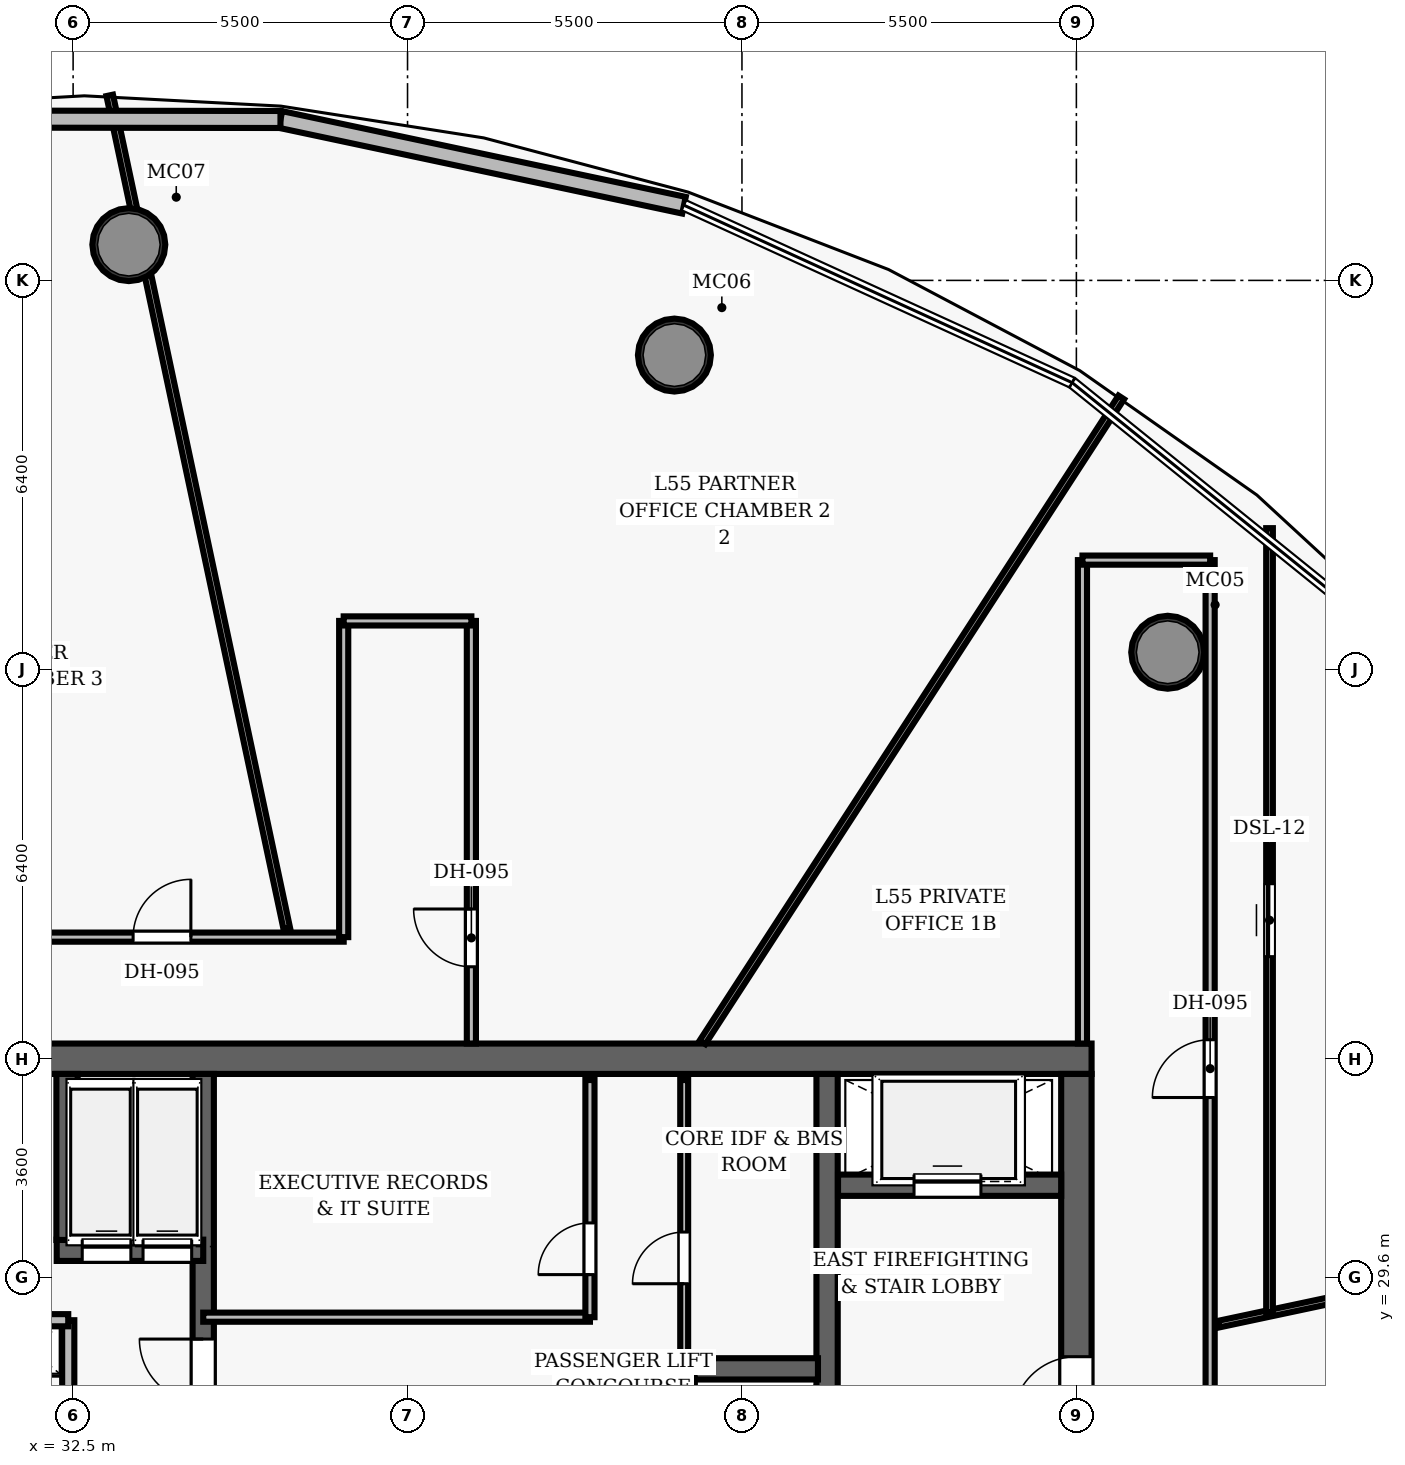
"""IFC4 building model, lengths in metres.
Left out: names, types, materials, properties, quantities, classifications, styles, units other than length and angle.
Written with IfcOpenShell. Run it as: python <this file> out.ifc"""

import sys

from ifc_helpers import new_model, si_unit, direction, frame, frame_2d, origin, origin_2d, place, context, subcontext, project, spatial, rectangle, hollow_circle, extrude, element, fill, save


model = new_model("IFC4")
c1 = context("Model", 3, precision=1e-05, world=origin(), true_north=direction((0.0, 1.0)))
c2 = subcontext(c1, "Body", "Model", "MODEL_VIEW")
j1 = project(units=[si_unit("LENGTHUNIT", "METRE"), si_unit("PLANEANGLEUNIT", "RADIAN")], contexts=[c1])
p1 = place(None, origin())
s1 = spatial("IfcSite", under=j1, at=p1, CompositionType="ELEMENT")
p2 = place(p1, origin())
s2 = spatial("IfcBuilding", under=s1, at=p2, CompositionType="ELEMENT")
p3 = place(p2, frame((0.0, 0.0, 217.4)))
s3 = spatial("IfcBuildingStorey", under=s2, at=p3, CompositionType="ELEMENT", Elevation=217.4)
p4 = place(p3, frame((26.75, 33.2, 0.0), z_axis=(0.0, 0.0, 1.0), x_axis=(1.0, 0.0, 0.0)))
e1 = element("IfcWall", 1, at=p4, inside=s3, PredefinedType="SHEAR", context=c2, shape_type="SweptSolid", body=[
    extrude(rectangle(XDim=22.5, YDim=0.5, at=frame_2d((11.25, 0.0))), origin(), (0.0, 0.0, 1.0), 3.85),
])
p5 = place(p3, frame((49.0, 19.05, 0.0), z_axis=(0.0, 0.0, 1.0), x_axis=(0.0, 1.0, 0.0)))
e2 = element("IfcWall", 2, at=p5, inside=s3, PredefinedType="SHEAR", context=c2, shape_type="SweptSolid", body=[
    extrude(rectangle(XDim=13.9, YDim=0.5, at=frame_2d((6.95, 0.0))), origin(), (0.0, 0.0, 1.0), 3.85),
])
p6 = place(p5, frame((8.2, 0.0, 0.0)))
e3 = element("IfcOpeningElement", 3, at=p6, cuts=e2, PredefinedType="OPENING", context=c2, shape_type="SweptSolid", body=[
    extrude(rectangle(XDim=1.05, YDim=2.15, at=frame_2d((0.525, 1.075))), frame((0.0, 0.26, 0.0), z_axis=(0.0, -1.0, 0.0), x_axis=(1.0, 0.0, 0.0)), (0.0, 0.0, 1.0), 0.52),
])
p7 = place(p3, frame((44.9, 19.05, 0.0), z_axis=(0.0, 0.0, 1.0), x_axis=(0.0, 1.0, 0.0)))
e4 = element("IfcWall", 4, at=p7, inside=s3, PredefinedType="SHEAR", context=c2, shape_type="SweptSolid", body=[
    extrude(rectangle(XDim=13.9, YDim=0.35, at=frame_2d((6.95, 0.0))), origin(), (0.0, 0.0, 1.0), 3.85),
])
for number, where, z_axis, x_axis in (
    (5, (50.502, 39.885, 0.0), (0.0, 0.0, 1.0), (1.0, 0.0, 0.0)),
    (6, (42.389, 44.772, 0.0), (0.0, 0.0, 1.0), (1.0, 0.0, 0.0)),
    (7, (33.416, 46.588, 0.0), (0.0, 0.0, 1.0), (1.0, 0.0, 0.0)),
):
    element("IfcColumn", number, at=place(p3, frame(where, z_axis=z_axis, x_axis=x_axis)), inside=s3, PredefinedType="COLUMN", context=c2, shape_type="SweptSolid", body=[
        extrude(hollow_circle(Radius=0.6, WallThickness=0.05, at=origin_2d()), origin(), (0.0, 0.0, 1.0), 3.85),
    ])
p8 = place(p3, frame((45.08, 31.12, 0.0), z_axis=(0.0, 0.0, 1.0), x_axis=(1.0, 0.0, 0.0)))
e8 = element("IfcWall", 8, at=p8, inside=s3, PredefinedType="SHEAR", context=c2, shape_type="SweptSolid", body=[
    extrude(rectangle(XDim=3.67, YDim=0.35, at=frame_2d((1.835, 0.0))), origin(), (0.0, 0.0, 1.0), 3.035),
])
p9 = place(p8, frame((1.25, 0.0, 0.0)))
e9 = element("IfcOpeningElement", 9, at=p9, cuts=e8, PredefinedType="OPENING", context=c2, shape_type="SweptSolid", body=[
    extrude(rectangle(XDim=1.1, YDim=2.15, at=frame_2d((0.55, 1.075))), frame((0.0, 0.185, 0.0), z_axis=(0.0, -1.0, 0.0), x_axis=(1.0, 0.0, 0.0)), (0.0, 0.0, 1.0), 0.37),
])
p10 = place(p3, frame((34.64, 26.69, 0.0), z_axis=(0.0, 0.0, 1.0), x_axis=(0.0, 1.0, 0.0)))
e10 = element("IfcWall", 10, at=p10, inside=s3, PredefinedType="SHEAR", context=c2, shape_type="SweptSolid", body=[
    extrude(rectangle(XDim=6.26, YDim=0.35, at=frame_2d((3.13, 0.0))), origin(), (0.0, 0.0, 1.0), 3.85),
])
p11 = place(p10, frame((0.85, 0.0, 0.0)))
e11 = element("IfcOpeningElement", 11, at=p11, cuts=e10, PredefinedType="OPENING", context=c2, shape_type="SweptSolid", body=[
    extrude(rectangle(XDim=1.05, YDim=2.15, at=frame_2d((0.525, 1.075))), frame((0.0, 0.185, 0.0), z_axis=(0.0, -1.0, 0.0), x_axis=(1.0, 0.0, 0.0)), (0.0, 0.0, 1.0), 0.37),
])
p12 = place(p3, frame((32.23, 30.05, 0.0), z_axis=(0.0, 0.0, 1.0), x_axis=(1.0, 0.0, 0.0)))
e12 = element("IfcWall", 12, at=p12, inside=s3, PredefinedType="SHEAR", context=c2, shape_type="SweptSolid", body=[
    extrude(rectangle(XDim=2.41, YDim=0.35, at=frame_2d((1.205, 0.0))), origin(), (0.0, 0.0, 1.0), 3.035),
])
p13 = place(p12, frame((0.42, 0.0, 0.0)))
e13 = element("IfcOpeningElement", 13, at=p13, cuts=e12, PredefinedType="OPENING", context=c2, shape_type="SweptSolid", body=[
    extrude(rectangle(XDim=0.8, YDim=2.15, at=frame_2d((0.4, 1.075))), frame((0.0, 0.185, 0.0), z_axis=(0.0, -1.0, 0.0), x_axis=(1.0, 0.0, 0.0)), (0.0, 0.0, 1.0), 0.37),
])
p14 = place(p12, frame((1.42, 0.0, 0.0)))
e14 = element("IfcOpeningElement", 14, at=p14, cuts=e12, PredefinedType="OPENING", context=c2, shape_type="SweptSolid", body=[
    extrude(rectangle(XDim=0.8, YDim=2.15, at=frame_2d((0.4, 1.075))), frame((0.0, 0.185, 0.0), z_axis=(0.0, -1.0, 0.0), x_axis=(1.0, 0.0, 0.0)), (0.0, 0.0, 1.0), 0.37),
])
p15 = place(p3, frame((32.4, 30.22, 0.0), z_axis=(0.0, 0.0, 1.0), x_axis=(0.0, 1.0, 0.0)))
e15 = element("IfcWall", 15, at=p15, inside=s3, PredefinedType="SHEAR", context=c2, shape_type="SweptSolid", body=[
    extrude(rectangle(XDim=2.73, YDim=0.35, at=frame_2d((1.365, 0.0))), origin(), (0.0, 0.0, 1.0), 3.035),
])
p16 = place(p3, frame((32.42, 26.86, 0.0), z_axis=(0.0, 0.0, 1.0), x_axis=(0.0, 1.0, 0.0)))
e16 = element("IfcWall", 16, at=p16, inside=s3, PredefinedType="PARTITIONING", context=c2, shape_type="SweptSolid", body=[
    extrude(rectangle(XDim=2.04, YDim=0.2, at=frame_2d((1.02, 0.0))), origin(), (0.0, 0.0, 1.0), 3.035),
])
p17 = place(p16, frame((0.14, 0.0, 0.0)))
e17 = element("IfcOpeningElement", 17, at=p17, cuts=e16, PredefinedType="OPENING", context=c2, shape_type="SweptSolid", body=[
    extrude(rectangle(XDim=0.8, YDim=2.05, at=frame_2d((0.4, 1.025))), frame((0.0, 0.11, 0.0), z_axis=(0.0, -1.0, 0.0), x_axis=(1.0, 0.0, 0.0)), (0.0, 0.0, 1.0), 0.22),
])
p18 = place(p3, frame((31.3, 28.9, 0.0), z_axis=(0.0, 0.0, 1.0), x_axis=(1.0, 0.0, 0.0)))
e18 = element("IfcWall", 18, at=p18, inside=s3, PredefinedType="PARTITIONING", context=c2, shape_type="SweptSolid", body=[
    extrude(rectangle(XDim=1.12, YDim=0.2, at=frame_2d((0.56, 0.0))), origin(), (0.0, 0.0, 1.0), 3.035),
])
p19 = place(p3, frame((42.55, 21.73, 0.0), z_axis=(0.0, 0.0, 1.0), x_axis=(0.0, 1.0, 0.0)))
e19 = element("IfcWall", 19, at=p19, inside=s3, PredefinedType="SHEAR", context=c2, shape_type="SweptSolid", body=[
    extrude(rectangle(XDim=6.54, YDim=0.35, at=frame_2d((3.27, 0.0))), origin(), (0.0, 0.0, 1.0), 3.035),
])
p20 = place(p3, frame((42.72, 28.1, 0.0), z_axis=(0.0, 0.0, 1.0), x_axis=(1.0, 0.0, 0.0)))
e20 = element("IfcWall", 20, at=p20, inside=s3, PredefinedType="SHEAR", context=c2, shape_type="SweptSolid", body=[
    extrude(rectangle(XDim=2.03, YDim=0.35, at=frame_2d((1.015, 0.0))), origin(), (0.0, 0.0, 1.0), 3.035),
])
p21 = place(p3, frame((34.64, 28.95, 0.0), z_axis=(0.0, 0.0, 1.0), x_axis=(1.0, 0.0, 0.0)))
e21 = element("IfcWall", 21, at=p21, inside=s3, PredefinedType="PARTITIONING", context=c2, shape_type="SweptSolid", body=[
    extrude(rectangle(XDim=6.36, YDim=0.15, at=frame_2d((3.18, 0.0))), origin(), (0.0, 0.0, 1.0), 3.035),
])
p22 = place(p3, frame((41.0, 28.95, 0.0), z_axis=(0.0, 0.0, 1.0), x_axis=(0.0, 1.0, 0.0)))
e22 = element("IfcWall", 22, at=p22, inside=s3, PredefinedType="PARTITIONING", context=c2, shape_type="SweptSolid", body=[
    extrude(rectangle(XDim=3.9, YDim=0.15, at=frame_2d((1.95, 0.0))), origin(), (0.0, 0.0, 1.0), 3.035),
])
p23 = place(p22, frame((0.7, 0.0, 0.0)))
e23 = element("IfcOpeningElement", 23, at=p23, cuts=e22, PredefinedType="OPENING", context=c2, shape_type="SweptSolid", body=[
    extrude(rectangle(XDim=0.85, YDim=2.1, at=frame_2d((0.425, 1.05))), frame((0.0, 0.085, 0.0), z_axis=(0.0, -1.0, 0.0), x_axis=(1.0, 0.0, 0.0)), (0.0, 0.0, 1.0), 0.17),
])
p24 = place(p3, frame((42.55, 28.1, 0.0), z_axis=(0.0, 0.0, 1.0), x_axis=(0.0, 1.0, 0.0)))
e24 = element("IfcWall", 24, at=p24, inside=s3, PredefinedType="PARTITIONING", context=c2, shape_type="SweptSolid", body=[
    extrude(rectangle(XDim=4.75, YDim=0.13, at=frame_2d((2.375, 0.0))), origin(), (0.0, 0.0, 1.0), 3.035),
])
p25 = place(p24, frame((1.4, 0.0, 0.0)))
e25 = element("IfcOpeningElement", 25, at=p25, cuts=e24, PredefinedType="OPENING", context=c2, shape_type="SweptSolid", body=[
    extrude(rectangle(XDim=0.85, YDim=2.1, at=frame_2d((0.425, 1.05))), frame((0.0, 0.075, 0.0), z_axis=(0.0, -1.0, 0.0), x_axis=(1.0, 0.0, 0.0)), (0.0, 0.0, 1.0), 0.15),
])
p26 = place(p3, frame((26.9, 35.2, 0.0), z_axis=(0.0, 0.0, 1.0), x_axis=(1.0, 0.0, 0.0)))
e26 = element("IfcWall", 26, at=p26, inside=s3, PredefinedType="PARTITIONING", context=c2, shape_type="SweptSolid", body=[
    extrude(rectangle(XDim=10.05, YDim=0.15, at=frame_2d((5.025, 0.0))), origin(), (0.0, 0.0, 1.0), 3.035),
])
p27 = place(p26, frame((6.587, 0.0, 0.0)))
e27 = element("IfcOpeningElement", 27, at=p27, cuts=e26, PredefinedType="OPENING", context=c2, shape_type="SweptSolid", body=[
    extrude(rectangle(XDim=0.95, YDim=2.15, at=frame_2d((0.475, 1.075))), frame((0.0, 0.085, 0.0), z_axis=(0.0, -1.0, 0.0), x_axis=(1.0, 0.0, 0.0)), (0.0, 0.0, 1.0), 0.17),
])
p28 = place(p3, frame((51.2, 10.6, 0.0), z_axis=(0.0, 0.0, 1.0), x_axis=(0.0, 1.0, 0.0)))
e28 = element("IfcWall", 28, at=p28, inside=s3, PredefinedType="PARTITIONING", context=c2, shape_type="SweptSolid", body=[
    extrude(rectangle(XDim=30.8, YDim=0.15, at=frame_2d((15.4, 0.0))), origin(), (0.0, 0.0, 1.0), 3.035),
])
p29 = place(p28, frame((21.962, 0.0, 0.0)))
e29 = element("IfcOpeningElement", 29, at=p29, cuts=e28, PredefinedType="OPENING", context=c2, shape_type="SweptSolid", body=[
    extrude(rectangle(XDim=0.95, YDim=2.15, at=frame_2d((0.475, 1.075))), frame((0.0, 0.085, 0.0), z_axis=(0.0, -1.0, 0.0), x_axis=(1.0, 0.0, 0.0)), (0.0, 0.0, 1.0), 0.17),
])
p30 = place(p28, frame((8.992, 0.0, 0.0)))
e30 = element("IfcOpeningElement", 30, at=p30, cuts=e28, PredefinedType="OPENING", context=c2, shape_type="SweptSolid", body=[
    extrude(rectangle(XDim=0.95, YDim=2.15, at=frame_2d((0.475, 1.075))), frame((0.0, 0.085, 0.0), z_axis=(0.0, -1.0, 0.0), x_axis=(1.0, 0.0, 0.0)), (0.0, 0.0, 1.0), 0.17),
])
p31 = place(p3, frame((49.1, 33.45, 0.0), z_axis=(0.0, 0.0, 1.0), x_axis=(0.0, 1.0, 0.0)))
e31 = element("IfcWall", 31, at=p31, inside=s3, PredefinedType="PARTITIONING", context=c2, shape_type="SweptSolid", body=[
    extrude(rectangle(XDim=7.95, YDim=0.15, at=frame_2d((3.975, 0.0))), origin(), (0.0, 0.0, 1.0), 3.035),
])
p32 = place(p3, frame((49.1, 41.4, 0.0), z_axis=(0.0, 0.0, 1.0), x_axis=(1.0, 0.0, 0.0)))
e32 = element("IfcWall", 32, at=p32, inside=s3, PredefinedType="PARTITIONING", context=c2, shape_type="SweptSolid", body=[
    extrude(rectangle(XDim=2.1, YDim=0.15, at=frame_2d((1.05, 0.0))), origin(), (0.0, 0.0, 1.0), 3.035),
])
p33 = place(p3, frame((36.95, 35.2, 0.0), z_axis=(0.0, 0.0, 1.0), x_axis=(0.0, 1.0, 0.0)))
e33 = element("IfcWall", 33, at=p33, inside=s3, PredefinedType="PARTITIONING", context=c2, shape_type="SweptSolid", body=[
    extrude(rectangle(XDim=5.2, YDim=0.15, at=frame_2d((2.6, 0.0))), origin(), (0.0, 0.0, 1.0), 3.035),
])
p34 = place(p3, frame((39.05, 33.45, 0.0), z_axis=(0.0, 0.0, 1.0), x_axis=(0.0, 1.0, 0.0)))
e34 = element("IfcWall", 34, at=p34, inside=s3, PredefinedType="PARTITIONING", context=c2, shape_type="SweptSolid", body=[
    extrude(rectangle(XDim=6.95, YDim=0.15, at=frame_2d((3.475, 0.0))), origin(), (0.0, 0.0, 1.0), 3.035),
])
p35 = place(p34, frame((1.262, 0.0, 0.0)))
e35 = element("IfcOpeningElement", 35, at=p35, cuts=e34, PredefinedType="OPENING", context=c2, shape_type="SweptSolid", body=[
    extrude(rectangle(XDim=0.95, YDim=2.15, at=frame_2d((0.475, 1.075))), frame((0.0, 0.085, 0.0), z_axis=(0.0, -1.0, 0.0), x_axis=(1.0, 0.0, 0.0)), (0.0, 0.0, 1.0), 0.17),
])
p36 = place(p3, frame((36.95, 40.4, 0.0), z_axis=(0.0, 0.0, 1.0), x_axis=(1.0, 0.0, 0.0)))
e36 = element("IfcWall", 36, at=p36, inside=s3, PredefinedType="PARTITIONING", context=c2, shape_type="SweptSolid", body=[
    extrude(rectangle(XDim=2.1, YDim=0.15, at=frame_2d((1.05, 0.0))), origin(), (0.0, 0.0, 1.0), 3.035),
])
p37 = place(p3, frame((51.34, 28.835, 0.0), z_axis=(0.0, 0.0, 1.0), x_axis=(0.978142366877, 0.207936312655, 0.0)))
e37 = element("IfcWall", 37, at=p37, inside=s3, PredefinedType="PARTITIONING", context=c2, shape_type="SweptSolid", body=[
    extrude(rectangle(XDim=9.224, YDim=0.11, at=frame_2d((4.612, 0.0))), origin(), (0.0, 0.0, 1.0), 3.035),
])
p38 = place(p3, frame((42.851, 33.47, 0.0), z_axis=(0.0, 0.0, 1.0), x_axis=(0.544631367438, 0.838675547278, 0.0)))
e38 = element("IfcWall", 38, at=p38, inside=s3, PredefinedType="PARTITIONING", context=c2, shape_type="SweptSolid", body=[
    extrude(rectangle(XDim=12.646, YDim=0.11, at=frame_2d((6.323, 0.0))), origin(), (0.0, 0.0, 1.0), 3.035),
])
p39 = place(p3, frame((36.015, 35.34, 0.0), z_axis=(0.0, 0.0, 1.0), x_axis=(-0.207905443256, 0.978148928673, 0.0)))
e39 = element("IfcWall", 39, at=p39, inside=s3, PredefinedType="PARTITIONING", context=c2, shape_type="SweptSolid", body=[
    extrude(rectangle(XDim=14.009, YDim=0.11, at=frame_2d((7.005, 0.0))), origin(), (0.0, 0.0, 1.0), 3.035),
])
p40 = place(p3, frame((52.177, 29.031, 0.0), z_axis=(0.0, 0.0, 1.0), x_axis=(0.0, 1.0, 0.0)))
e40 = element("IfcWall", 40, at=p40, inside=s3, PredefinedType="PARTITIONING", context=c2, shape_type="SweptSolid", body=[
    extrude(rectangle(XDim=12.894, YDim=0.11, at=frame_2d((6.447, 0.0))), origin(), (0.0, 0.0, 1.0), 3.035),
])
p41 = place(p40, frame((5.847, 0.0, 0.0)))
e41 = element("IfcOpeningElement", 41, at=p41, cuts=e40, PredefinedType="OPENING", context=c2, shape_type="SweptSolid", body=[
    extrude(rectangle(XDim=1.2, YDim=2.15, at=frame_2d((0.6, 1.075))), frame((0.0, 0.065, 0.0), z_axis=(0.0, -1.0, 0.0), x_axis=(1.0, 0.0, 0.0)), (0.0, 0.0, 1.0), 0.13),
])
p42 = place(p3, frame((35.91, 48.646, 0.0), z_axis=(0.0, 0.0, 1.0), x_axis=(0.978160131295, -0.207852730423, 0.0)))
e42 = element("IfcWall", 42, at=p42, inside=s3, PredefinedType="SOLIDWALL", context=c2, shape_type="SweptSolid", body=[
    extrude(rectangle(XDim=6.784, YDim=0.28, at=frame_2d((3.392, 0.0))), origin(), (0.0, 0.0, 1.0), 3.62),
])
p43 = place(p3, frame((29.684, 48.654, 0.0), z_axis=(0.0, 0.0, 1.0), x_axis=(0.999999212858, -0.001254704157, 0.0)))
e43 = element("IfcWall", 43, at=p43, inside=s3, PredefinedType="SOLIDWALL", context=c2, shape_type="SweptSolid", body=[
    extrude(rectangle(XDim=6.227, YDim=0.28, at=frame_2d((3.113, 0.0))), origin(), (0.0, 0.0, 1.0), 3.62),
])
p44 = place(p6, origin())
e44 = element("IfcDoor", 44, at=p44, inside=s3, OperationType="SINGLE_SWING_LEFT", PredefinedType="DOOR", context=c2, shape_type="SweptSolid", body=[
    extrude(rectangle(XDim=1.05, YDim=2.15, at=frame_2d((0.525, 1.075))), frame((0.0, 0.025, 0.0), z_axis=(0.0, -1.0, 0.0), x_axis=(1.0, 0.0, 0.0)), (0.0, 0.0, 1.0), 0.05),
])
fill(e3, e44)
p45 = place(p11, origin())
e45 = element("IfcDoor", 45, at=p45, inside=s3, OperationType="SINGLE_SWING_RIGHT", PredefinedType="DOOR", context=c2, shape_type="SweptSolid", body=[
    extrude(rectangle(XDim=1.05, YDim=2.15, at=frame_2d((0.525, 1.075))), frame((0.0, 0.025, 0.0), z_axis=(0.0, -1.0, 0.0), x_axis=(1.0, 0.0, 0.0)), (0.0, 0.0, 1.0), 0.05),
])
fill(e11, e45)
p46 = place(p23, origin())
e46 = element("IfcDoor", 46, at=p46, inside=s3, OperationType="SINGLE_SWING_LEFT", PredefinedType="DOOR", context=c2, shape_type="SweptSolid", body=[
    extrude(rectangle(XDim=0.85, YDim=2.1, at=frame_2d((0.425, 1.05))), frame((0.0, 0.025, 0.0), z_axis=(0.0, -1.0, 0.0), x_axis=(1.0, 0.0, 0.0)), (0.0, 0.0, 1.0), 0.05),
])
fill(e23, e46)
p47 = place(p25, origin())
e47 = element("IfcDoor", 47, at=p47, inside=s3, OperationType="SINGLE_SWING_LEFT", PredefinedType="DOOR", context=c2, shape_type="SweptSolid", body=[
    extrude(rectangle(XDim=0.85, YDim=2.1, at=frame_2d((0.425, 1.05))), frame((0.0, 0.025, 0.0), z_axis=(0.0, -1.0, 0.0), x_axis=(1.0, 0.0, 0.0)), (0.0, 0.0, 1.0), 0.05),
])
fill(e25, e47)
p48 = place(p29, origin())
e48 = element("IfcDoor", 48, at=p48, inside=s3, OperationType="SINGLE_SWING_LEFT", PredefinedType="DOOR", context=c2, shape_type="SweptSolid", body=[
    extrude(rectangle(XDim=0.95, YDim=2.15, at=frame_2d((0.475, 1.075))), frame((0.0, 0.025, 0.0), z_axis=(0.0, -1.0, 0.0), x_axis=(1.0, 0.0, 0.0)), (0.0, 0.0, 1.0), 0.05),
])
fill(e29, e48)
p49 = place(p41, origin())
e49 = element("IfcDoor", 49, at=p49, inside=s3, OperationType="SLIDING_TO_RIGHT", PredefinedType="DOOR", context=c2, shape_type="SweptSolid", body=[
    extrude(rectangle(XDim=1.2, YDim=2.15, at=frame_2d((0.6, 1.075))), frame((0.0, 0.025, 0.0), z_axis=(0.0, -1.0, 0.0), x_axis=(1.0, 0.0, 0.0)), (0.0, 0.0, 1.0), 0.05),
])
fill(e41, e49)
p50 = place(p35, origin())
e50 = element("IfcDoor", 50, at=p50, inside=s3, OperationType="SINGLE_SWING_RIGHT", PredefinedType="DOOR", context=c2, shape_type="SweptSolid", body=[
    extrude(rectangle(XDim=0.95, YDim=2.15, at=frame_2d((0.475, 1.075))), frame((0.0, 0.025, 0.0), z_axis=(0.0, -1.0, 0.0), x_axis=(1.0, 0.0, 0.0)), (0.0, 0.0, 1.0), 0.05),
])
fill(e35, e50)
p51 = place(p27, origin())
e51 = element("IfcDoor", 51, at=p51, inside=s3, OperationType="SINGLE_SWING_RIGHT", PredefinedType="DOOR", context=c2, shape_type="SweptSolid", body=[
    extrude(rectangle(XDim=0.95, YDim=2.15, at=frame_2d((0.475, 1.075))), frame((0.0, 0.025, 0.0), z_axis=(0.0, -1.0, 0.0), x_axis=(1.0, 0.0, 0.0)), (0.0, 0.0, 1.0), 0.05),
])
fill(e27, e51)
p52 = place(p9, origin())
e52 = element("IfcDoor", 52, at=p52, inside=s3, OperationType="SLIDING_TO_LEFT", PredefinedType="DOOR", context=c2, shape_type="SweptSolid", body=[
    extrude(rectangle(XDim=1.1, YDim=2.15, at=frame_2d((0.55, 1.075))), frame((0.0, 0.025, 0.0), z_axis=(0.0, -1.0, 0.0), x_axis=(1.0, 0.0, 0.0)), (0.0, 0.0, 1.0), 0.05),
])
fill(e9, e52)
p53 = place(p13, origin())
e53 = element("IfcDoor", 53, at=p53, inside=s3, OperationType="SLIDING_TO_LEFT", PredefinedType="DOOR", context=c2, shape_type="SweptSolid", body=[
    extrude(rectangle(XDim=0.8, YDim=2.15, at=frame_2d((0.4, 1.075))), frame((0.0, 0.025, 0.0), z_axis=(0.0, -1.0, 0.0), x_axis=(1.0, 0.0, 0.0)), (0.0, 0.0, 1.0), 0.05),
])
fill(e13, e53)
p54 = place(p14, origin())
e54 = element("IfcDoor", 54, at=p54, inside=s3, OperationType="SLIDING_TO_LEFT", PredefinedType="DOOR", context=c2, shape_type="SweptSolid", body=[
    extrude(rectangle(XDim=0.8, YDim=2.15, at=frame_2d((0.4, 1.075))), frame((0.0, 0.025, 0.0), z_axis=(0.0, -1.0, 0.0), x_axis=(1.0, 0.0, 0.0)), (0.0, 0.0, 1.0), 0.05),
])
fill(e14, e54)
save(model, sys.argv[1])
